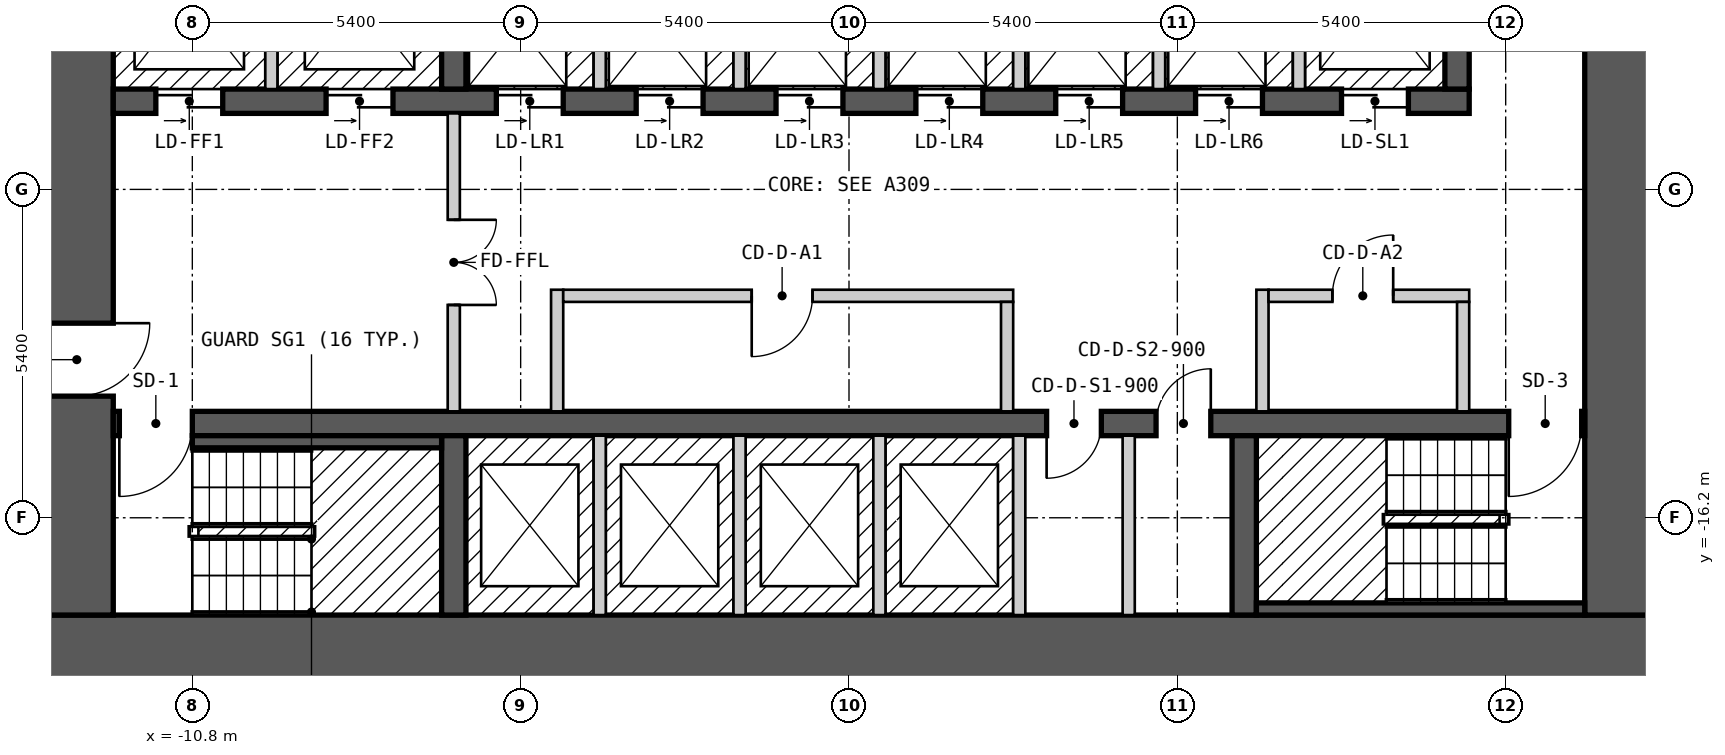
"""IFC4 building model, lengths in metres.
Left out: names, types, materials, properties, quantities, classifications, styles, units other than length and angle.
Written with IfcOpenShell. Run it as: python <this file> out.ifc"""

import sys

from ifc_helpers import new_model, si_unit, direction, frame, frame_2d, origin, place, context, subcontext, project, spatial, rectangle, extrude, element, fill, save


model = new_model("IFC4")
c1 = context("Model", 3, precision=1e-05, world=origin(), true_north=direction((0.0, 1.0)))
c2 = subcontext(c1, "Body", "Model", "MODEL_VIEW")
j1 = project(units=[si_unit("LENGTHUNIT", "METRE"), si_unit("PLANEANGLEUNIT", "RADIAN")], contexts=[c1])
p1 = place(None, origin())
s1 = spatial("IfcSite", under=j1, at=p1, CompositionType="ELEMENT")
p2 = place(p1, origin())
s2 = spatial("IfcBuilding", under=s1, at=p2, CompositionType="ELEMENT")
p3 = place(p2, frame((0.0, 0.0, 23.4)))
s3 = spatial("IfcBuildingStorey", under=s2, at=p3, CompositionType="ELEMENT", Elevation=23.4)
p4 = place(p3, frame((-13.3, -18.4, 0.0), z_axis=(0.0, 0.0, 1.0), x_axis=(1.0, 0.0, 0.0)))
e1 = element("IfcWall", 1, at=p4, inside=s3, PredefinedType="SHEAR", context=c2, shape_type="SweptSolid", body=[
    extrude(rectangle(XDim=26.6, YDim=1.2, at=frame_2d((13.3, 0.0))), origin(), (0.0, 0.0, 1.0), 2.7),
])
p5 = place(p3, frame((-12.7, -17.8, 0.0), z_axis=(0.0, 0.0, 1.0), x_axis=(0.0, 1.0, 0.0)))
e2 = element("IfcWall", 2, at=p5, inside=s3, PredefinedType="SHEAR", context=c2, shape_type="SweptSolid", body=[
    extrude(rectangle(XDim=11.6, YDim=1.2, at=frame_2d((5.8, 0.0))), origin(), (0.0, 0.0, 1.0), 2.7),
])
p6 = place(p5, frame((3.6, 0.0, 0.0)))
e3 = element("IfcOpeningElement", 3, at=p6, cuts=e2, PredefinedType="OPENING", context=c2, shape_type="SweptSolid", body=[
    extrude(rectangle(XDim=1.2, YDim=2.1, at=frame_2d((0.6, 1.05))), frame((0.0, 0.61, 0.0), z_axis=(0.0, -1.0, 0.0), x_axis=(1.0, 0.0, 0.0)), (0.0, 0.0, 1.0), 1.22),
])
p7 = place(p3, frame((12.7, -17.8, 0.0), z_axis=(0.0, 0.0, 1.0), x_axis=(0.0, 1.0, 0.0)))
e4 = element("IfcWall", 4, at=p7, inside=s3, PredefinedType="SHEAR", context=c2, shape_type="SweptSolid", body=[
    extrude(rectangle(XDim=11.6, YDim=1.2, at=frame_2d((5.8, 0.0))), origin(), (0.0, 0.0, 1.0), 2.7),
])
p8 = place(p3, frame((-12.1, -14.65, 0.0), z_axis=(0.0, 0.0, 1.0), x_axis=(1.0, 0.0, 0.0)))
e5 = element("IfcWall", 5, at=p8, inside=s3, PredefinedType="SHEAR", context=c2, shape_type="SweptSolid", body=[
    extrude(rectangle(XDim=24.2, YDim=0.4, at=frame_2d((12.1, 0.0))), origin(), (0.0, 0.0, 1.0), 2.7),
])
p9 = place(p8, frame((1.3, 0.0, 0.0), z_axis=(0.0, 0.0, 1.0), x_axis=(-1.0, 0.0, 0.0)))
e6 = element("IfcOpeningElement", 6, at=p9, cuts=e5, PredefinedType="OPENING", context=c2, shape_type="SweptSolid", body=[
    extrude(rectangle(XDim=1.2, YDim=2.1, at=frame_2d((0.6, 1.05))), frame((0.0, 0.21, 0.0), z_axis=(0.0, -1.0, 0.0), x_axis=(1.0, 0.0, 0.0)), (0.0, 0.0, 1.0), 0.42),
])
p10 = place(p8, frame((24.15, 0.0, 0.0), z_axis=(0.0, 0.0, 1.0), x_axis=(-1.0, 0.0, 0.0)))
e7 = element("IfcOpeningElement", 7, at=p10, cuts=e5, PredefinedType="OPENING", context=c2, shape_type="SweptSolid", body=[
    extrude(rectangle(XDim=1.2, YDim=2.1, at=frame_2d((0.6, 1.05))), frame((0.0, 0.21, 0.0), z_axis=(0.0, -1.0, 0.0), x_axis=(1.0, 0.0, 0.0)), (0.0, 0.0, 1.0), 0.42),
])
p11 = place(p8, frame((16.25, 0.0, 0.0), z_axis=(0.0, 0.0, 1.0), x_axis=(-1.0, 0.0, 0.0)))
e8 = element("IfcOpeningElement", 8, at=p11, cuts=e5, PredefinedType="OPENING", context=c2, shape_type="SweptSolid", body=[
    extrude(rectangle(XDim=0.9, YDim=2.1, at=frame_2d((0.45, 1.05))), frame((0.0, 0.21, 0.0), z_axis=(0.0, -1.0, 0.0), x_axis=(1.0, 0.0, 0.0)), (0.0, 0.0, 1.0), 0.42),
])
p12 = place(p8, frame((18.05, 0.0, 0.0), z_axis=(0.0, 0.0, 1.0), x_axis=(-1.0, 0.0, 0.0)))
e9 = element("IfcOpeningElement", 9, at=p12, cuts=e5, PredefinedType="OPENING", context=c2, shape_type="SweptSolid", body=[
    extrude(rectangle(XDim=0.9, YDim=2.1, at=frame_2d((0.45, 1.05))), frame((0.0, 0.21, 0.0), z_axis=(0.0, -1.0, 0.0), x_axis=(1.0, 0.0, 0.0)), (0.0, 0.0, 1.0), 0.42),
])
p13 = place(p3, frame((-12.1, -9.35, 0.0), z_axis=(0.0, 0.0, 1.0), x_axis=(1.0, 0.0, 0.0)))
e10 = element("IfcWall", 10, at=p13, inside=s3, PredefinedType="SHEAR", context=c2, shape_type="SweptSolid", body=[
    extrude(rectangle(XDim=22.3, YDim=0.4, at=frame_2d((11.15, 0.0))), origin(), (0.0, 0.0, 1.0), 2.7),
])
p14 = place(p13, frame((0.7, 0.0, 0.0)))
e11 = element("IfcOpeningElement", 11, at=p14, cuts=e10, PredefinedType="OPENING", context=c2, shape_type="SweptSolid", body=[
    extrude(rectangle(XDim=1.1, YDim=2.1, at=frame_2d((0.55, 1.05))), frame((0.0, 0.21, 0.0), z_axis=(0.0, -1.0, 0.0), x_axis=(1.0, 0.0, 0.0)), (0.0, 0.0, 1.0), 0.42),
])
p15 = place(p13, frame((3.5, 0.0, 0.0)))
e12 = element("IfcOpeningElement", 12, at=p15, cuts=e10, PredefinedType="OPENING", context=c2, shape_type="SweptSolid", body=[
    extrude(rectangle(XDim=1.1, YDim=2.1, at=frame_2d((0.55, 1.05))), frame((0.0, 0.21, 0.0), z_axis=(0.0, -1.0, 0.0), x_axis=(1.0, 0.0, 0.0)), (0.0, 0.0, 1.0), 0.42),
])
p16 = place(p13, frame((6.3, 0.0, 0.0)))
e13 = element("IfcOpeningElement", 13, at=p16, cuts=e10, PredefinedType="OPENING", context=c2, shape_type="SweptSolid", body=[
    extrude(rectangle(XDim=1.1, YDim=2.1, at=frame_2d((0.55, 1.05))), frame((0.0, 0.21, 0.0), z_axis=(0.0, -1.0, 0.0), x_axis=(1.0, 0.0, 0.0)), (0.0, 0.0, 1.0), 0.42),
])
p17 = place(p13, frame((8.6, 0.0, 0.0)))
e14 = element("IfcOpeningElement", 14, at=p17, cuts=e10, PredefinedType="OPENING", context=c2, shape_type="SweptSolid", body=[
    extrude(rectangle(XDim=1.1, YDim=2.1, at=frame_2d((0.55, 1.05))), frame((0.0, 0.21, 0.0), z_axis=(0.0, -1.0, 0.0), x_axis=(1.0, 0.0, 0.0)), (0.0, 0.0, 1.0), 0.42),
])
p18 = place(p13, frame((10.9, 0.0, 0.0)))
e15 = element("IfcOpeningElement", 15, at=p18, cuts=e10, PredefinedType="OPENING", context=c2, shape_type="SweptSolid", body=[
    extrude(rectangle(XDim=1.1, YDim=2.1, at=frame_2d((0.55, 1.05))), frame((0.0, 0.21, 0.0), z_axis=(0.0, -1.0, 0.0), x_axis=(1.0, 0.0, 0.0)), (0.0, 0.0, 1.0), 0.42),
])
p19 = place(p13, frame((13.2, 0.0, 0.0)))
e16 = element("IfcOpeningElement", 16, at=p19, cuts=e10, PredefinedType="OPENING", context=c2, shape_type="SweptSolid", body=[
    extrude(rectangle(XDim=1.1, YDim=2.1, at=frame_2d((0.55, 1.05))), frame((0.0, 0.21, 0.0), z_axis=(0.0, -1.0, 0.0), x_axis=(1.0, 0.0, 0.0)), (0.0, 0.0, 1.0), 0.42),
])
p20 = place(p13, frame((15.5, 0.0, 0.0)))
e17 = element("IfcOpeningElement", 17, at=p20, cuts=e10, PredefinedType="OPENING", context=c2, shape_type="SweptSolid", body=[
    extrude(rectangle(XDim=1.1, YDim=2.1, at=frame_2d((0.55, 1.05))), frame((0.0, 0.21, 0.0), z_axis=(0.0, -1.0, 0.0), x_axis=(1.0, 0.0, 0.0)), (0.0, 0.0, 1.0), 0.42),
])
p21 = place(p13, frame((17.8, 0.0, 0.0)))
e18 = element("IfcOpeningElement", 18, at=p21, cuts=e10, PredefinedType="OPENING", context=c2, shape_type="SweptSolid", body=[
    extrude(rectangle(XDim=1.1, YDim=2.1, at=frame_2d((0.55, 1.05))), frame((0.0, 0.21, 0.0), z_axis=(0.0, -1.0, 0.0), x_axis=(1.0, 0.0, 0.0)), (0.0, 0.0, 1.0), 0.42),
])
p22 = place(p13, frame((20.2, 0.0, 0.0)))
e19 = element("IfcOpeningElement", 19, at=p22, cuts=e10, PredefinedType="OPENING", context=c2, shape_type="SweptSolid", body=[
    extrude(rectangle(XDim=1.1, YDim=2.1, at=frame_2d((0.55, 1.05))), frame((0.0, 0.21, 0.0), z_axis=(0.0, -1.0, 0.0), x_axis=(1.0, 0.0, 0.0)), (0.0, 0.0, 1.0), 0.42),
])
for number, where, z_axis, x_axis in (
    (20, (-6.5, -17.8, 0.0), (0.0, 0.0, 1.0), (0.0, 1.0, 0.0)),
    (21, (6.5, -17.8, 0.0), (0.0, 0.0, 1.0), (0.0, 1.0, 0.0)),
    (22, (-6.5, -9.15, 0.0), (0.0, 0.0, 1.0), (0.0, 1.0, 0.0)),
    (23, (10.0, -9.15, 0.0), (0.0, 0.0, 1.0), (0.0, 1.0, 0.0)),
):
    element("IfcWall", number, at=place(p3, frame(where, z_axis=z_axis, x_axis=x_axis)), inside=s3, PredefinedType="SHEAR", context=c2, shape_type="SweptSolid", body=[
        extrude(rectangle(XDim=2.95, YDim=0.4, at=frame_2d((1.475, 0.0))), origin(), (0.0, 0.0, 1.0), 2.7),
    ])
p23 = place(p3, frame((-10.8, -14.95, 0.0), z_axis=(0.0, 0.0, 1.0), x_axis=(1.0, 0.0, 0.0)))
e24 = element("IfcWall", 24, at=p23, inside=s3, PredefinedType="SOLIDWALL", context=c2, shape_type="SweptSolid", body=[
    extrude(rectangle(XDim=4.1, YDim=0.2, at=frame_2d((2.05, 0.0))), origin(), (0.0, 0.0, 1.0), 2.7),
])
p24 = place(p3, frame((-9.5, -9.15, 0.0), z_axis=(0.0, 0.0, 1.0), x_axis=(0.0, 1.0, 0.0)))
e25 = element("IfcWall", 25, at=p24, inside=s3, PredefinedType="SOLIDWALL", context=c2, shape_type="SweptSolid", body=[
    extrude(rectangle(XDim=2.95, YDim=0.2, at=frame_2d((1.475, 0.0))), origin(), (0.0, 0.0, 1.0), 2.7),
])
p25 = place(p3, frame((-6.5, -14.45, 0.0), z_axis=(0.0, 0.0, 1.0), x_axis=(0.0, 1.0, 0.0)))
e26 = element("IfcWall", 26, at=p25, inside=s3, PredefinedType="PARTITIONING", context=c2, shape_type="SweptSolid", body=[
    extrude(rectangle(XDim=4.9, YDim=0.2, at=frame_2d((2.45, 0.0))), origin(), (0.0, 0.0, 1.0), 2.7),
])
p26 = place(p25, frame((3.15, 0.0, 0.0), z_axis=(0.0, 0.0, 1.0), x_axis=(-1.0, 0.0, 0.0)))
e27 = element("IfcOpeningElement", 27, at=p26, cuts=e26, PredefinedType="OPENING", context=c2, shape_type="SweptSolid", body=[
    extrude(rectangle(XDim=1.4, YDim=2.1, at=frame_2d((0.7, 1.05))), frame((0.0, 0.11, 0.0), z_axis=(0.0, -1.0, 0.0), x_axis=(1.0, 0.0, 0.0)), (0.0, 0.0, 1.0), 0.22),
])
p27 = place(p3, frame((-4.8, -14.45, 0.0), z_axis=(0.0, 0.0, 1.0), x_axis=(0.0, 1.0, 0.0)))
e28 = element("IfcWall", 28, at=p27, inside=s3, PredefinedType="PARTITIONING", context=c2, shape_type="SweptSolid", body=[
    extrude(rectangle(XDim=2.0, YDim=0.2, at=frame_2d((1.0, 0.0))), origin(), (0.0, 0.0, 1.0), 2.7),
])
p28 = place(p3, frame((-4.7, -12.55, 0.0), z_axis=(0.0, 0.0, 1.0), x_axis=(1.0, 0.0, 0.0)))
e29 = element("IfcWall", 29, at=p28, inside=s3, PredefinedType="PARTITIONING", context=c2, shape_type="SweptSolid", body=[
    extrude(rectangle(XDim=7.4, YDim=0.2, at=frame_2d((3.7, 0.0))), origin(), (0.0, 0.0, 1.0), 2.7),
])
p29 = place(p28, frame((4.1, 0.0, 0.0), z_axis=(0.0, 0.0, 1.0), x_axis=(-1.0, 0.0, 0.0)))
e30 = element("IfcOpeningElement", 30, at=p29, cuts=e29, PredefinedType="OPENING", context=c2, shape_type="SweptSolid", body=[
    extrude(rectangle(XDim=1.0, YDim=2.1, at=frame_2d((0.5, 1.05))), frame((0.0, 0.11, 0.0), z_axis=(0.0, -1.0, 0.0), x_axis=(1.0, 0.0, 0.0)), (0.0, 0.0, 1.0), 0.22),
])
for number, where, z_axis, x_axis in (
    (31, (-4.1, -17.8, 0.0), (0.0, 0.0, 1.0), (0.0, 1.0, 0.0)),
    (32, (-4.1, -9.15, 0.0), (0.0, 0.0, 1.0), (0.0, 1.0, 0.0)),
    (33, (-1.8, -17.8, 0.0), (0.0, 0.0, 1.0), (0.0, 1.0, 0.0)),
    (34, (-1.8, -9.15, 0.0), (0.0, 0.0, 1.0), (0.0, 1.0, 0.0)),
    (35, (0.5, -17.8, 0.0), (0.0, 0.0, 1.0), (0.0, 1.0, 0.0)),
    (36, (0.5, -9.15, 0.0), (0.0, 0.0, 1.0), (0.0, 1.0, 0.0)),
):
    element("IfcWall", number, at=place(p3, frame(where, z_axis=z_axis, x_axis=x_axis)), inside=s3, PredefinedType="SOLIDWALL", context=c2, shape_type="SweptSolid", body=[
        extrude(rectangle(XDim=2.95, YDim=0.2, at=frame_2d((1.475, 0.0))), origin(), (0.0, 0.0, 1.0), 2.7),
    ])
p30 = place(p3, frame((2.6, -14.45, 0.0), z_axis=(0.0, 0.0, 1.0), x_axis=(0.0, 1.0, 0.0)))
e37 = element("IfcWall", 37, at=p30, inside=s3, PredefinedType="PARTITIONING", context=c2, shape_type="SweptSolid", body=[
    extrude(rectangle(XDim=1.8, YDim=0.2, at=frame_2d((0.9, 0.0))), origin(), (0.0, 0.0, 1.0), 2.7),
])
for number, where, z_axis, x_axis in (
    (38, (2.8, -17.8, 0.0), (0.0, 0.0, 1.0), (0.0, 1.0, 0.0)),
    (39, (2.8, -9.15, 0.0), (0.0, 0.0, 1.0), (0.0, 1.0, 0.0)),
):
    element("IfcWall", number, at=place(p3, frame(where, z_axis=z_axis, x_axis=x_axis)), inside=s3, PredefinedType="SOLIDWALL", context=c2, shape_type="SweptSolid", body=[
        extrude(rectangle(XDim=2.95, YDim=0.2, at=frame_2d((1.475, 0.0))), origin(), (0.0, 0.0, 1.0), 2.7),
    ])
p31 = place(p3, frame((4.6, -17.8, 0.0), z_axis=(0.0, 0.0, 1.0), x_axis=(0.0, 1.0, 0.0)))
e40 = element("IfcWall", 40, at=p31, inside=s3, PredefinedType="PARTITIONING", context=c2, shape_type="SweptSolid", body=[
    extrude(rectangle(XDim=2.95, YDim=0.2, at=frame_2d((1.475, 0.0))), origin(), (0.0, 0.0, 1.0), 2.7),
])
p32 = place(p3, frame((5.1, -9.15, 0.0), z_axis=(0.0, 0.0, 1.0), x_axis=(0.0, 1.0, 0.0)))
e41 = element("IfcWall", 41, at=p32, inside=s3, PredefinedType="SOLIDWALL", context=c2, shape_type="SweptSolid", body=[
    extrude(rectangle(XDim=2.95, YDim=0.2, at=frame_2d((1.475, 0.0))), origin(), (0.0, 0.0, 1.0), 2.7),
])
p33 = place(p3, frame((6.7, -17.7, 0.0), z_axis=(0.0, 0.0, 1.0), x_axis=(1.0, 0.0, 0.0)))
e42 = element("IfcWall", 42, at=p33, inside=s3, PredefinedType="SOLIDWALL", context=c2, shape_type="SweptSolid", body=[
    extrude(rectangle(XDim=5.4, YDim=0.2, at=frame_2d((2.7, 0.0))), origin(), (0.0, 0.0, 1.0), 2.7),
])
p34 = place(p3, frame((6.8, -14.45, 0.0), z_axis=(0.0, 0.0, 1.0), x_axis=(0.0, 1.0, 0.0)))
e43 = element("IfcWall", 43, at=p34, inside=s3, PredefinedType="PARTITIONING", context=c2, shape_type="SweptSolid", body=[
    extrude(rectangle(XDim=2.0, YDim=0.2, at=frame_2d((1.0, 0.0))), origin(), (0.0, 0.0, 1.0), 2.7),
])
p35 = place(p3, frame((6.9, -12.55, 0.0), z_axis=(0.0, 0.0, 1.0), x_axis=(1.0, 0.0, 0.0)))
e44 = element("IfcWall", 44, at=p35, inside=s3, PredefinedType="PARTITIONING", context=c2, shape_type="SweptSolid", body=[
    extrude(rectangle(XDim=3.3, YDim=0.2, at=frame_2d((1.65, 0.0))), origin(), (0.0, 0.0, 1.0), 2.7),
])
p36 = place(p35, frame((2.05, 0.0, 0.0), z_axis=(0.0, 0.0, 1.0), x_axis=(-1.0, 0.0, 0.0)))
e45 = element("IfcOpeningElement", 45, at=p36, cuts=e44, PredefinedType="OPENING", context=c2, shape_type="SweptSolid", body=[
    extrude(rectangle(XDim=1.0, YDim=2.1, at=frame_2d((0.5, 1.05))), frame((0.0, 0.11, 0.0), z_axis=(0.0, -1.0, 0.0), x_axis=(1.0, 0.0, 0.0)), (0.0, 0.0, 1.0), 0.22),
])
p37 = place(p3, frame((7.4, -9.15, 0.0), z_axis=(0.0, 0.0, 1.0), x_axis=(0.0, 1.0, 0.0)))
e46 = element("IfcWall", 46, at=p37, inside=s3, PredefinedType="SOLIDWALL", context=c2, shape_type="SweptSolid", body=[
    extrude(rectangle(XDim=2.95, YDim=0.2, at=frame_2d((1.475, 0.0))), origin(), (0.0, 0.0, 1.0), 2.7),
])
p38 = place(p3, frame((10.1, -14.45, 0.0), z_axis=(0.0, 0.0, 1.0), x_axis=(0.0, 1.0, 0.0)))
e47 = element("IfcWall", 47, at=p38, inside=s3, PredefinedType="PARTITIONING", context=c2, shape_type="SweptSolid", body=[
    extrude(rectangle(XDim=1.8, YDim=0.2, at=frame_2d((0.9, 0.0))), origin(), (0.0, 0.0, 1.0), 2.7),
])
p39 = place(p14, origin())
e48 = element("IfcDoor", 48, at=p39, inside=s3, OperationType="DOUBLE_DOOR_SLIDING", PredefinedType="DOOR", context=c2, shape_type="SweptSolid", body=[
    extrude(rectangle(XDim=1.1, YDim=2.1, at=frame_2d((0.55, 1.05))), frame((0.0, 0.025, 0.0), z_axis=(0.0, -1.0, 0.0), x_axis=(1.0, 0.0, 0.0)), (0.0, 0.0, 1.0), 0.05),
])
fill(e11, e48)
p40 = place(p15, origin())
e49 = element("IfcDoor", 49, at=p40, inside=s3, OperationType="DOUBLE_DOOR_SLIDING", PredefinedType="DOOR", context=c2, shape_type="SweptSolid", body=[
    extrude(rectangle(XDim=1.1, YDim=2.1, at=frame_2d((0.55, 1.05))), frame((0.0, 0.025, 0.0), z_axis=(0.0, -1.0, 0.0), x_axis=(1.0, 0.0, 0.0)), (0.0, 0.0, 1.0), 0.05),
])
fill(e12, e49)
p41 = place(p16, origin())
e50 = element("IfcDoor", 50, at=p41, inside=s3, OperationType="DOUBLE_DOOR_SLIDING", PredefinedType="DOOR", context=c2, shape_type="SweptSolid", body=[
    extrude(rectangle(XDim=1.1, YDim=2.1, at=frame_2d((0.55, 1.05))), frame((0.0, 0.025, 0.0), z_axis=(0.0, -1.0, 0.0), x_axis=(1.0, 0.0, 0.0)), (0.0, 0.0, 1.0), 0.05),
])
fill(e13, e50)
p42 = place(p17, origin())
e51 = element("IfcDoor", 51, at=p42, inside=s3, OperationType="DOUBLE_DOOR_SLIDING", PredefinedType="DOOR", context=c2, shape_type="SweptSolid", body=[
    extrude(rectangle(XDim=1.1, YDim=2.1, at=frame_2d((0.55, 1.05))), frame((0.0, 0.025, 0.0), z_axis=(0.0, -1.0, 0.0), x_axis=(1.0, 0.0, 0.0)), (0.0, 0.0, 1.0), 0.05),
])
fill(e14, e51)
p43 = place(p18, origin())
e52 = element("IfcDoor", 52, at=p43, inside=s3, OperationType="DOUBLE_DOOR_SLIDING", PredefinedType="DOOR", context=c2, shape_type="SweptSolid", body=[
    extrude(rectangle(XDim=1.1, YDim=2.1, at=frame_2d((0.55, 1.05))), frame((0.0, 0.025, 0.0), z_axis=(0.0, -1.0, 0.0), x_axis=(1.0, 0.0, 0.0)), (0.0, 0.0, 1.0), 0.05),
])
fill(e15, e52)
p44 = place(p19, origin())
e53 = element("IfcDoor", 53, at=p44, inside=s3, OperationType="DOUBLE_DOOR_SLIDING", PredefinedType="DOOR", context=c2, shape_type="SweptSolid", body=[
    extrude(rectangle(XDim=1.1, YDim=2.1, at=frame_2d((0.55, 1.05))), frame((0.0, 0.025, 0.0), z_axis=(0.0, -1.0, 0.0), x_axis=(1.0, 0.0, 0.0)), (0.0, 0.0, 1.0), 0.05),
])
fill(e16, e53)
p45 = place(p20, origin())
e54 = element("IfcDoor", 54, at=p45, inside=s3, OperationType="DOUBLE_DOOR_SLIDING", PredefinedType="DOOR", context=c2, shape_type="SweptSolid", body=[
    extrude(rectangle(XDim=1.1, YDim=2.1, at=frame_2d((0.55, 1.05))), frame((0.0, 0.025, 0.0), z_axis=(0.0, -1.0, 0.0), x_axis=(1.0, 0.0, 0.0)), (0.0, 0.0, 1.0), 0.05),
])
fill(e17, e54)
p46 = place(p21, origin())
e55 = element("IfcDoor", 55, at=p46, inside=s3, OperationType="DOUBLE_DOOR_SLIDING", PredefinedType="DOOR", context=c2, shape_type="SweptSolid", body=[
    extrude(rectangle(XDim=1.1, YDim=2.1, at=frame_2d((0.55, 1.05))), frame((0.0, 0.025, 0.0), z_axis=(0.0, -1.0, 0.0), x_axis=(1.0, 0.0, 0.0)), (0.0, 0.0, 1.0), 0.05),
])
fill(e18, e55)
p47 = place(p22, origin())
e56 = element("IfcDoor", 56, at=p47, inside=s3, OperationType="DOUBLE_DOOR_SLIDING", PredefinedType="DOOR", context=c2, shape_type="SweptSolid", body=[
    extrude(rectangle(XDim=1.1, YDim=2.1, at=frame_2d((0.55, 1.05))), frame((0.0, 0.025, 0.0), z_axis=(0.0, -1.0, 0.0), x_axis=(1.0, 0.0, 0.0)), (0.0, 0.0, 1.0), 0.05),
])
fill(e19, e56)
p48 = place(p9, origin())
e57 = element("IfcDoor", 57, at=p48, inside=s3, OperationType="SINGLE_SWING_RIGHT", PredefinedType="DOOR", context=c2, shape_type="SweptSolid", body=[
    extrude(rectangle(XDim=1.2, YDim=2.1, at=frame_2d((0.6, 1.05))), frame((0.0, 0.025, 0.0), z_axis=(0.0, -1.0, 0.0), x_axis=(1.0, 0.0, 0.0)), (0.0, 0.0, 1.0), 0.05),
])
fill(e6, e57)
p49 = place(p10, origin())
e58 = element("IfcDoor", 58, at=p49, inside=s3, OperationType="SINGLE_SWING_RIGHT", PredefinedType="DOOR", context=c2, shape_type="SweptSolid", body=[
    extrude(rectangle(XDim=1.2, YDim=2.1, at=frame_2d((0.6, 1.05))), frame((0.0, 0.025, 0.0), z_axis=(0.0, -1.0, 0.0), x_axis=(1.0, 0.0, 0.0)), (0.0, 0.0, 1.0), 0.05),
])
fill(e7, e58)
p50 = place(p6, origin())
e59 = element("IfcDoor", 59, at=p50, inside=s3, OperationType="SINGLE_SWING_RIGHT", PredefinedType="DOOR", context=c2, shape_type="SweptSolid", body=[
    extrude(rectangle(XDim=1.2, YDim=2.1, at=frame_2d((0.6, 1.05))), frame((0.0, 0.025, 0.0), z_axis=(0.0, -1.0, 0.0), x_axis=(1.0, 0.0, 0.0)), (0.0, 0.0, 1.0), 0.05),
])
fill(e3, e59)
p51 = place(p26, origin())
e60 = element("IfcDoor", 60, at=p51, inside=s3, OperationType="DOUBLE_DOOR_SINGLE_SWING", PredefinedType="DOOR", context=c2, shape_type="SweptSolid", body=[
    extrude(rectangle(XDim=1.4, YDim=2.1, at=frame_2d((0.7, 1.05))), frame((0.0, 0.025, 0.0), z_axis=(0.0, -1.0, 0.0), x_axis=(1.0, 0.0, 0.0)), (0.0, 0.0, 1.0), 0.05),
])
fill(e27, e60)
p52 = place(p29, origin())
e61 = element("IfcDoor", 61, at=p52, inside=s3, OperationType="SINGLE_SWING_RIGHT", PredefinedType="DOOR", context=c2, shape_type="SweptSolid", body=[
    extrude(rectangle(XDim=1.0, YDim=2.1, at=frame_2d((0.5, 1.05))), frame((0.0, 0.025, 0.0), z_axis=(0.0, -1.0, 0.0), x_axis=(1.0, 0.0, 0.0)), (0.0, 0.0, 1.0), 0.05),
])
fill(e30, e61)
p53 = place(p36, origin())
e62 = element("IfcDoor", 62, at=p53, inside=s3, OperationType="SINGLE_SWING_LEFT", PredefinedType="DOOR", context=c2, shape_type="SweptSolid", body=[
    extrude(rectangle(XDim=1.0, YDim=2.1, at=frame_2d((0.5, 1.05))), frame((0.0, 0.025, 0.0), z_axis=(0.0, -1.0, 0.0), x_axis=(1.0, 0.0, 0.0)), (0.0, 0.0, 1.0), 0.05),
])
fill(e45, e62)
p54 = place(p11, origin())
e63 = element("IfcDoor", 63, at=p54, inside=s3, OperationType="SINGLE_SWING_RIGHT", PredefinedType="DOOR", context=c2, shape_type="SweptSolid", body=[
    extrude(rectangle(XDim=0.9, YDim=2.1, at=frame_2d((0.45, 1.05))), frame((0.0, 0.025, 0.0), z_axis=(0.0, -1.0, 0.0), x_axis=(1.0, 0.0, 0.0)), (0.0, 0.0, 1.0), 0.05),
])
fill(e8, e63)
p55 = place(p12, origin())
e64 = element("IfcDoor", 64, at=p55, inside=s3, OperationType="SINGLE_SWING_LEFT", PredefinedType="DOOR", context=c2, shape_type="SweptSolid", body=[
    extrude(rectangle(XDim=0.9, YDim=2.1, at=frame_2d((0.45, 1.05))), frame((0.0, 0.025, 0.0), z_axis=(0.0, -1.0, 0.0), x_axis=(1.0, 0.0, 0.0)), (0.0, 0.0, 1.0), 0.05),
])
fill(e9, e64)
save(model, sys.argv[1])
